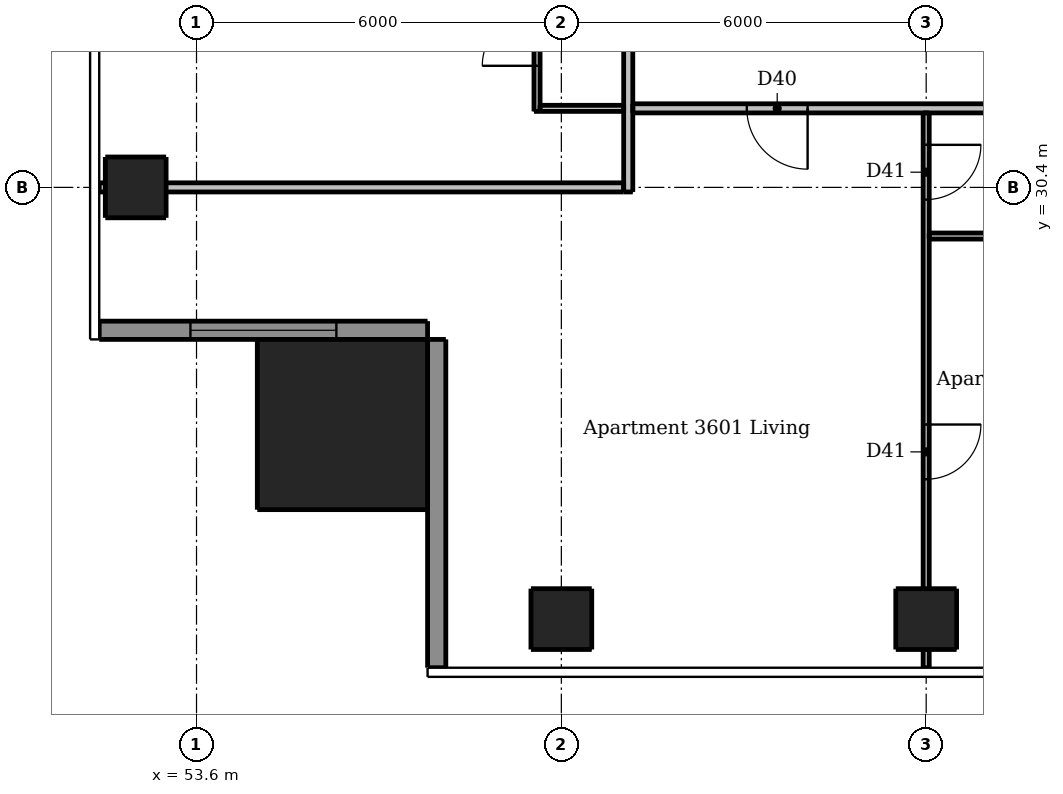
"""IFC4 building model, lengths in metres.
Left out: names, types, materials, properties, quantities, classifications, styles, units other than length and angle.
Written with IfcOpenShell. Run it as: python <this file> out.ifc"""

import sys

from ifc_helpers import new_model, si_unit, direction, frame, frame_2d, origin, origin_2d, place, context, subcontext, project, spatial, rectangle, extrude, element, fill, save


model = new_model("IFC4")
c1 = context("Model", 3, precision=1e-05, world=origin(), true_north=direction((0.0, 1.0)))
c2 = subcontext(c1, "Body", "Model", "MODEL_VIEW")
j1 = project(units=[si_unit("LENGTHUNIT", "METRE"), si_unit("PLANEANGLEUNIT", "RADIAN")], contexts=[c1])
p1 = place(None, origin())
s1 = spatial("IfcSite", under=j1, at=p1, CompositionType="ELEMENT")
p2 = place(p1, origin())
s2 = spatial("IfcBuilding", under=s1, at=p2, CompositionType="ELEMENT")
p3 = place(p2, frame((0.0, 0.0, 137.2)))
s3 = spatial("IfcBuildingStorey", under=s2, at=p3, CompositionType="ELEMENT", Elevation=137.2)
for number, where, z_axis, x_axis in (
    (1, (59.6, 23.3, 0.0), (0.0, 0.0, 1.0), (1.0, 0.0, 0.0)),
    (2, (65.6, 23.3, 0.0), (0.0, 0.0, 1.0), (1.0, 0.0, 0.0)),
    (3, (52.6, 30.4, 0.0), (0.0, 0.0, 1.0), (1.0, 0.0, 0.0)),
):
    element("IfcColumn", number, at=place(p3, frame(where, z_axis=z_axis, x_axis=x_axis)), inside=s3, PredefinedType="COLUMN", context=c2, shape_type="SweptSolid", body=[
        extrude(rectangle(XDim=1.0, YDim=1.0, at=origin_2d()), origin(), (0.0, 0.0, 1.0), 3.05),
    ])
p4 = place(p3, frame((56.0, 26.5, 0.0), z_axis=(0.0, 0.0, 1.0), x_axis=(1.0, 0.0, 0.0)))
e4 = element("IfcColumn", 4, at=p4, inside=s3, PredefinedType="COLUMN", context=c2, shape_type="SweptSolid", body=[
    extrude(rectangle(XDim=2.8, YDim=2.8, at=origin_2d()), origin(), (0.0, 0.0, 1.0), 3.3),
])
p5 = place(p3, frame((52.0, 28.05, 0.0), z_axis=(0.0, 0.0, 1.0), x_axis=(1.0, 0.0, 0.0)))
e5 = element("IfcWall", 5, at=p5, inside=s3, PredefinedType="SOLIDWALL", context=c2, shape_type="SweptSolid", body=[
    extrude(rectangle(XDim=5.4, YDim=0.3, at=frame_2d((2.7, 0.0))), origin(), (0.0, 0.0, 1.0), 3.05),
])
p6 = place(p5, frame((1.5, 0.0, 0.15)))
e6 = element("IfcOpeningElement", 6, at=p6, cuts=e5, PredefinedType="OPENING", context=c2, shape_type="SweptSolid", body=[
    extrude(rectangle(XDim=2.4, YDim=2.1, at=frame_2d((1.2, 1.05))), frame((0.0, 0.16, 0.0), z_axis=(0.0, -1.0, 0.0), x_axis=(1.0, 0.0, 0.0)), (0.0, 0.0, 1.0), 0.32),
])
p7 = place(p3, frame((57.55, 27.9, 0.0), z_axis=(0.0, 0.0, 1.0), x_axis=(0.0, -1.0, 0.0)))
e7 = element("IfcWall", 7, at=p7, inside=s3, PredefinedType="SOLIDWALL", context=c2, shape_type="SweptSolid", body=[
    extrude(rectangle(XDim=5.4, YDim=0.3, at=frame_2d((2.7, 0.0))), origin(), (0.0, 0.0, 1.0), 3.05),
])
p8 = place(p3, frame((59.2, 31.65, 0.0), z_axis=(0.0, 0.0, 1.0), x_axis=(0.0, 1.0, 0.0)))
e8 = element("IfcWall", 8, at=p8, inside=s3, PredefinedType="PARTITIONING", context=c2, shape_type="SweptSolid", body=[
    extrude(rectangle(XDim=16.675, YDim=0.1, at=frame_2d((8.337, 0.0))), origin(), (0.0, 0.0, 1.0), 3.05),
])
p9 = place(p8, frame((0.75, 0.0, 0.0)))
e9 = element("IfcOpeningElement", 9, at=p9, cuts=e8, PredefinedType="OPENING", context=c2, shape_type="SweptSolid", body=[
    extrude(rectangle(XDim=0.9, YDim=2.1, at=frame_2d((0.45, 1.05))), frame((0.0, 0.06, 0.0), z_axis=(0.0, -1.0, 0.0), x_axis=(1.0, 0.0, 0.0)), (0.0, 0.0, 1.0), 0.12),
])
p10 = place(p8, frame((3.1, 0.0, 0.0)))
e10 = element("IfcOpeningElement", 10, at=p10, cuts=e8, PredefinedType="OPENING", context=c2, shape_type="SweptSolid", body=[
    extrude(rectangle(XDim=0.9, YDim=2.1, at=frame_2d((0.45, 1.05))), frame((0.0, 0.06, 0.0), z_axis=(0.0, -1.0, 0.0), x_axis=(1.0, 0.0, 0.0)), (0.0, 0.0, 1.0), 0.12),
])
p11 = place(p8, frame((8.5, 0.0, 0.0)))
e11 = element("IfcOpeningElement", 11, at=p11, cuts=e8, PredefinedType="OPENING", context=c2, shape_type="SweptSolid", body=[
    extrude(rectangle(XDim=0.9, YDim=2.1, at=frame_2d((0.45, 1.05))), frame((0.0, 0.06, 0.0), z_axis=(0.0, -1.0, 0.0), x_axis=(1.0, 0.0, 0.0)), (0.0, 0.0, 1.0), 0.12),
])
p12 = place(p8, frame((14.5, 0.0, 0.0)))
e12 = element("IfcOpeningElement", 12, at=p12, cuts=e8, PredefinedType="OPENING", context=c2, shape_type="SweptSolid", body=[
    extrude(rectangle(XDim=0.9, YDim=2.1, at=frame_2d((0.45, 1.05))), frame((0.0, 0.06, 0.0), z_axis=(0.0, -1.0, 0.0), x_axis=(1.0, 0.0, 0.0)), (0.0, 0.0, 1.0), 0.12),
])
p13 = place(p8, frame((5.55, 0.0, 0.0)))
e13 = element("IfcOpeningElement", 13, at=p13, cuts=e8, PredefinedType="OPENING", context=c2, shape_type="SweptSolid", body=[
    extrude(rectangle(XDim=0.8, YDim=2.1, at=frame_2d((0.4, 1.05))), frame((0.0, 0.06, 0.0), z_axis=(0.0, -1.0, 0.0), x_axis=(1.0, 0.0, 0.0)), (0.0, 0.0, 1.0), 0.12),
])
p14 = place(p8, frame((11.55, 0.0, 0.0)))
e14 = element("IfcOpeningElement", 14, at=p14, cuts=e8, PredefinedType="OPENING", context=c2, shape_type="SweptSolid", body=[
    extrude(rectangle(XDim=0.8, YDim=2.1, at=frame_2d((0.4, 1.05))), frame((0.0, 0.06, 0.0), z_axis=(0.0, -1.0, 0.0), x_axis=(1.0, 0.0, 0.0)), (0.0, 0.0, 1.0), 0.12),
])
p15 = place(p3, frame((65.6, 31.625, 0.0), z_axis=(0.0, 0.0, 1.0), x_axis=(0.0, -1.0, 0.0)))
e15 = element("IfcWall", 15, at=p15, inside=s3, PredefinedType="PARTITIONING", context=c2, shape_type="SweptSolid", body=[
    extrude(rectangle(XDim=9.125, YDim=0.1, at=frame_2d((4.562, 0.0))), origin(), (0.0, 0.0, 1.0), 2.516),
])
p16 = place(p15, frame((0.525, 0.0, 0.0)))
e16 = element("IfcOpeningElement", 16, at=p16, cuts=e15, PredefinedType="OPENING", context=c2, shape_type="SweptSolid", body=[
    extrude(rectangle(XDim=0.9, YDim=2.1, at=frame_2d((0.45, 1.05))), frame((0.0, 0.06, 0.0), z_axis=(0.0, -1.0, 0.0), x_axis=(1.0, 0.0, 0.0)), (0.0, 0.0, 1.0), 0.12),
])
p17 = place(p15, frame((5.125, 0.0, 0.0)))
e17 = element("IfcOpeningElement", 17, at=p17, cuts=e15, PredefinedType="OPENING", context=c2, shape_type="SweptSolid", body=[
    extrude(rectangle(XDim=0.9, YDim=2.1, at=frame_2d((0.45, 1.05))), frame((0.0, 0.06, 0.0), z_axis=(0.0, -1.0, 0.0), x_axis=(1.0, 0.0, 0.0)), (0.0, 0.0, 1.0), 0.12),
])
p18 = place(p3, frame((59.25, 31.7, 0.0), z_axis=(0.0, 0.0, 1.0), x_axis=(1.0, 0.0, 0.0)))
e18 = element("IfcWall", 18, at=p18, inside=s3, PredefinedType="PARTITIONING", context=c2, shape_type="SweptSolid", body=[
    extrude(rectangle(XDim=1.375, YDim=0.1, at=frame_2d((0.688, 0.0))), origin(), (0.0, 0.0, 1.0), 3.05),
])
p19 = place(p3, frame((65.65, 29.6, 0.0), z_axis=(0.0, 0.0, 1.0), x_axis=(1.0, 0.0, 0.0)))
e19 = element("IfcWall", 19, at=p19, inside=s3, PredefinedType="PARTITIONING", context=c2, shape_type="SweptSolid", body=[
    extrude(rectangle(XDim=5.875, YDim=0.1, at=frame_2d((2.938, 0.0))), origin(), (0.0, 0.0, 1.0), 3.05),
])
p20 = place(p19, frame((3.75, 0.0, 0.0)))
e20 = element("IfcOpeningElement", 20, at=p20, cuts=e19, PredefinedType="OPENING", context=c2, shape_type="SweptSolid", body=[
    extrude(rectangle(XDim=0.8, YDim=2.1, at=frame_2d((0.4, 1.05))), frame((0.0, 0.06, 0.0), z_axis=(0.0, -1.0, 0.0), x_axis=(1.0, 0.0, 0.0)), (0.0, 0.0, 1.0), 0.12),
])
p21 = place(p3, frame((60.7, 30.325, 0.0), z_axis=(0.0, 0.0, 1.0), x_axis=(0.0, 1.0, 0.0)))
e21 = element("IfcWall", 21, at=p21, inside=s3, PredefinedType="PARTITIONING", context=c2, shape_type="SweptSolid", body=[
    extrude(rectangle(XDim=28.9, YDim=0.15, at=frame_2d((14.45, 0.0))), origin(), (0.0, 0.0, 1.0), 3.05),
])
p22 = place(p21, frame((9.225, 0.0, 0.0)))
e22 = element("IfcOpeningElement", 22, at=p22, cuts=e21, PredefinedType="OPENING", context=c2, shape_type="SweptSolid", body=[
    extrude(rectangle(XDim=1.0, YDim=2.1, at=frame_2d((0.5, 1.05))), frame((0.0, 0.085, 0.0), z_axis=(0.0, -1.0, 0.0), x_axis=(1.0, 0.0, 0.0)), (0.0, 0.0, 1.0), 0.17),
])
p23 = place(p21, frame((26.025, 0.0, 0.0)))
e23 = element("IfcOpeningElement", 23, at=p23, cuts=e21, PredefinedType="OPENING", context=c2, shape_type="SweptSolid", body=[
    extrude(rectangle(XDim=1.0, YDim=2.1, at=frame_2d((0.5, 1.05))), frame((0.0, 0.085, 0.0), z_axis=(0.0, -1.0, 0.0), x_axis=(1.0, 0.0, 0.0)), (0.0, 0.0, 1.0), 0.17),
])
p24 = place(p3, frame((89.525, 31.7, 0.0), z_axis=(0.0, 0.0, 1.0), x_axis=(-1.0, 0.0, 0.0)))
e24 = element("IfcWall", 24, at=p24, inside=s3, PredefinedType="PARTITIONING", context=c2, shape_type="SweptSolid", body=[
    extrude(rectangle(XDim=28.75, YDim=0.15, at=frame_2d((14.375, 0.0))), origin(), (0.0, 0.0, 1.0), 3.05),
])
p25 = place(p24, frame((25.875, 0.0, 0.0)))
e25 = element("IfcOpeningElement", 25, at=p25, cuts=e24, PredefinedType="OPENING", context=c2, shape_type="SweptSolid", body=[
    extrude(rectangle(XDim=1.0, YDim=2.1, at=frame_2d((0.5, 1.05))), frame((0.0, 0.085, 0.0), z_axis=(0.0, -1.0, 0.0), x_axis=(1.0, 0.0, 0.0)), (0.0, 0.0, 1.0), 0.17),
])
p26 = place(p24, frame((9.075, 0.0, 0.0)))
e26 = element("IfcOpeningElement", 26, at=p26, cuts=e24, PredefinedType="OPENING", context=c2, shape_type="SweptSolid", body=[
    extrude(rectangle(XDim=1.0, YDim=2.1, at=frame_2d((0.5, 1.05))), frame((0.0, 0.085, 0.0), z_axis=(0.0, -1.0, 0.0), x_axis=(1.0, 0.0, 0.0)), (0.0, 0.0, 1.0), 0.17),
])
p27 = place(p3, frame((52.0, 30.4, 0.0), z_axis=(0.0, 0.0, 1.0), x_axis=(1.0, 0.0, 0.0)))
e27 = element("IfcWall", 27, at=p27, inside=s3, PredefinedType="PARTITIONING", context=c2, shape_type="SweptSolid", body=[
    extrude(rectangle(XDim=8.625, YDim=0.15, at=frame_2d((4.312, 0.0))), origin(), (0.0, 0.0, 1.0), 2.647),
])
p28 = place(p6, origin())
e28 = element("IfcWindow", 28, at=p28, inside=s3, PartitioningType="DOUBLE_PANEL_VERTICAL", PredefinedType="WINDOW", context=c2, shape_type="SweptSolid", body=[
    extrude(rectangle(XDim=2.4, YDim=2.1, at=frame_2d((1.2, 1.05))), frame((0.0, 0.03, 0.0), z_axis=(0.0, -1.0, 0.0), x_axis=(1.0, 0.0, 0.0)), (0.0, 0.0, 1.0), 0.06),
])
fill(e6, e28)
p29 = place(p25, origin())
e29 = element("IfcDoor", 29, at=p29, inside=s3, OperationType="SINGLE_SWING_LEFT", PredefinedType="DOOR", context=c2, shape_type="SweptSolid", body=[
    extrude(rectangle(XDim=1.0, YDim=2.1, at=frame_2d((0.5, 1.05))), frame((0.0, 0.025, 0.0), z_axis=(0.0, -1.0, 0.0), x_axis=(1.0, 0.0, 0.0)), (0.0, 0.0, 1.0), 0.05),
])
fill(e25, e29)
p30 = place(p16, origin())
e30 = element("IfcDoor", 30, at=p30, inside=s3, OperationType="SINGLE_SWING_LEFT", PredefinedType="DOOR", context=c2, shape_type="SweptSolid", body=[
    extrude(rectangle(XDim=0.9, YDim=2.1, at=frame_2d((0.45, 1.05))), frame((0.0, 0.025, 0.0), z_axis=(0.0, -1.0, 0.0), x_axis=(1.0, 0.0, 0.0)), (0.0, 0.0, 1.0), 0.05),
])
fill(e16, e30)
p31 = place(p17, origin())
e31 = element("IfcDoor", 31, at=p31, inside=s3, OperationType="SINGLE_SWING_LEFT", PredefinedType="DOOR", context=c2, shape_type="SweptSolid", body=[
    extrude(rectangle(XDim=0.9, YDim=2.1, at=frame_2d((0.45, 1.05))), frame((0.0, 0.025, 0.0), z_axis=(0.0, -1.0, 0.0), x_axis=(1.0, 0.0, 0.0)), (0.0, 0.0, 1.0), 0.05),
])
fill(e17, e31)
p32 = place(p9, origin())
e32 = element("IfcDoor", 32, at=p32, inside=s3, OperationType="SINGLE_SWING_LEFT", PredefinedType="DOOR", context=c2, shape_type="SweptSolid", body=[
    extrude(rectangle(XDim=0.9, YDim=2.1, at=frame_2d((0.45, 1.05))), frame((0.0, 0.025, 0.0), z_axis=(0.0, -1.0, 0.0), x_axis=(1.0, 0.0, 0.0)), (0.0, 0.0, 1.0), 0.05),
])
fill(e9, e32)
save(model, sys.argv[1])
